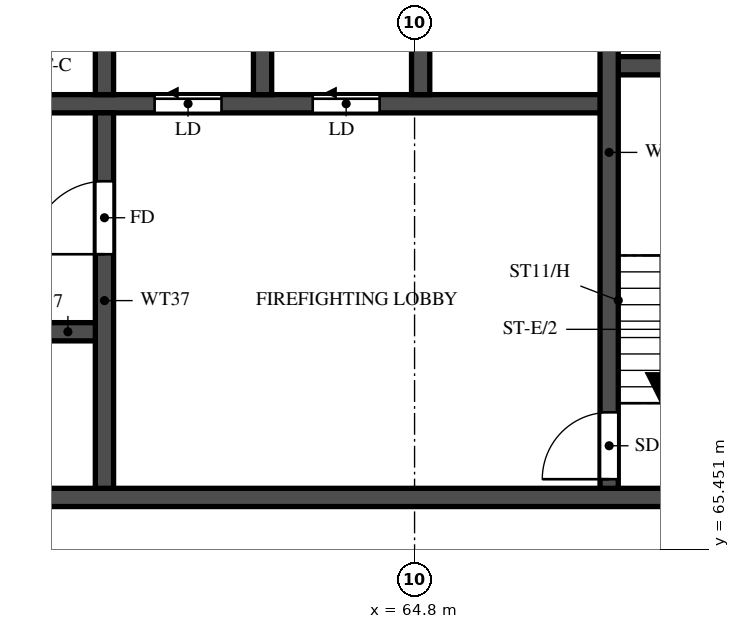
"""IFC4 building model, lengths in metres.
Left out: names, types, materials, properties, quantities, classifications, styles, units other than length and angle.
Written with IfcOpenShell. Run it as: python <this file> out.ifc"""

import sys

from ifc_helpers import new_model, si_unit, direction, frame, frame_2d, origin, place, context, subcontext, project, spatial, rectangle, extrude, element, fill, save


model = new_model("IFC4")
c1 = context("Model", 3, precision=1e-05, world=origin(), true_north=direction((0.0, 1.0)))
c2 = subcontext(c1, "Body", "Model", "MODEL_VIEW")
j1 = project(units=[si_unit("LENGTHUNIT", "METRE"), si_unit("PLANEANGLEUNIT", "RADIAN")], contexts=[c1])
p1 = place(None, origin())
s1 = spatial("IfcSite", under=j1, at=p1, CompositionType="ELEMENT")
p2 = place(p1, origin())
s2 = spatial("IfcBuilding", under=s1, at=p2, CompositionType="ELEMENT")
p3 = place(p2, frame((0.0, 0.0, 264.0)))
s3 = spatial("IfcBuildingStorey", under=s2, at=p3, CompositionType="ELEMENT", Elevation=264.0)
p4 = place(p3, frame((29.2, 66.3, 0.0), z_axis=(0.0, 0.0, 1.0), x_axis=(1.0, 0.0, 0.0)))
e1 = element("IfcWall", 1, at=p4, inside=s3, PredefinedType="SHEAR", context=c2, shape_type="SweptSolid", body=[
    extrude(rectangle(XDim=42.4, YDim=0.3, at=frame_2d((21.2, 0.0))), origin(), (0.0, 0.0, 1.0), 3.22),
])
p5 = place(p4, frame((1.425, 0.0, 0.0)))
e2 = element("IfcOpeningElement", 2, at=p5, cuts=e1, PredefinedType="OPENING", context=c2, shape_type="SweptSolid", body=[
    extrude(rectangle(XDim=1.1, YDim=2.1, at=frame_2d((0.55, 1.05))), frame((0.0, 0.16, 0.0), z_axis=(0.0, -1.0, 0.0), x_axis=(1.0, 0.0, 0.0)), (0.0, 0.0, 1.0), 0.32),
])
p6 = place(p4, frame((4.2, 0.0, 0.0)))
e3 = element("IfcOpeningElement", 3, at=p6, cuts=e1, PredefinedType="OPENING", context=c2, shape_type="SweptSolid", body=[
    extrude(rectangle(XDim=1.8, YDim=2.1, at=frame_2d((0.9, 1.05))), frame((0.0, 0.16, 0.0), z_axis=(0.0, -1.0, 0.0), x_axis=(1.0, 0.0, 0.0)), (0.0, 0.0, 1.0), 0.32),
])
p7 = place(p3, frame((35.65, 69.025, 0.0), z_axis=(0.0, 0.0, 1.0), x_axis=(1.0, 0.0, 0.0)))
e4 = element("IfcWall", 4, at=p7, inside=s3, PredefinedType="SHEAR", context=c2, shape_type="SweptSolid", body=[
    extrude(rectangle(XDim=24.05, YDim=0.3, at=frame_2d((12.025, 0.0))), origin(), (0.0, 0.0, 1.0), 3.22),
])
p8 = place(p7, frame((0.975, 0.0, 0.0)))
e5 = element("IfcOpeningElement", 5, at=p8, cuts=e4, PredefinedType="OPENING", context=c2, shape_type="SweptSolid", body=[
    extrude(rectangle(XDim=1.1, YDim=2.1, at=frame_2d((0.55, 1.05))), frame((0.0, 0.16, 0.0), z_axis=(0.0, -1.0, 0.0), x_axis=(1.0, 0.0, 0.0)), (0.0, 0.0, 1.0), 0.32),
])
p9 = place(p7, frame((3.725, 0.0, 0.0)))
e6 = element("IfcOpeningElement", 6, at=p9, cuts=e4, PredefinedType="OPENING", context=c2, shape_type="SweptSolid", body=[
    extrude(rectangle(XDim=1.1, YDim=2.1, at=frame_2d((0.55, 1.05))), frame((0.0, 0.16, 0.0), z_axis=(0.0, -1.0, 0.0), x_axis=(1.0, 0.0, 0.0)), (0.0, 0.0, 1.0), 0.32),
])
p10 = place(p7, frame((6.475, 0.0, 0.0)))
e7 = element("IfcOpeningElement", 7, at=p10, cuts=e4, PredefinedType="OPENING", context=c2, shape_type="SweptSolid", body=[
    extrude(rectangle(XDim=1.1, YDim=2.1, at=frame_2d((0.55, 1.05))), frame((0.0, 0.16, 0.0), z_axis=(0.0, -1.0, 0.0), x_axis=(1.0, 0.0, 0.0)), (0.0, 0.0, 1.0), 0.32),
])
p11 = place(p7, frame((9.225, 0.0, 0.0)))
e8 = element("IfcOpeningElement", 8, at=p11, cuts=e4, PredefinedType="OPENING", context=c2, shape_type="SweptSolid", body=[
    extrude(rectangle(XDim=1.1, YDim=2.1, at=frame_2d((0.55, 1.05))), frame((0.0, 0.16, 0.0), z_axis=(0.0, -1.0, 0.0), x_axis=(1.0, 0.0, 0.0)), (0.0, 0.0, 1.0), 0.32),
])
p12 = place(p7, frame((11.975, 0.0, 0.0)))
e9 = element("IfcOpeningElement", 9, at=p12, cuts=e4, PredefinedType="OPENING", context=c2, shape_type="SweptSolid", body=[
    extrude(rectangle(XDim=1.1, YDim=2.1, at=frame_2d((0.55, 1.05))), frame((0.0, 0.16, 0.0), z_axis=(0.0, -1.0, 0.0), x_axis=(1.0, 0.0, 0.0)), (0.0, 0.0, 1.0), 0.32),
])
p13 = place(p7, frame((14.725, 0.0, 0.0)))
e10 = element("IfcOpeningElement", 10, at=p13, cuts=e4, PredefinedType="OPENING", context=c2, shape_type="SweptSolid", body=[
    extrude(rectangle(XDim=1.1, YDim=2.1, at=frame_2d((0.55, 1.05))), frame((0.0, 0.16, 0.0), z_axis=(0.0, -1.0, 0.0), x_axis=(1.0, 0.0, 0.0)), (0.0, 0.0, 1.0), 0.32),
])
p14 = place(p7, frame((17.6, 0.0, 0.0)))
e11 = element("IfcOpeningElement", 11, at=p14, cuts=e4, PredefinedType="OPENING", context=c2, shape_type="SweptSolid", body=[
    extrude(rectangle(XDim=1.1, YDim=2.1, at=frame_2d((0.55, 1.05))), frame((0.0, 0.16, 0.0), z_axis=(0.0, -1.0, 0.0), x_axis=(1.0, 0.0, 0.0)), (0.0, 0.0, 1.0), 0.32),
])
p15 = place(p7, frame((20.6, 0.0, 0.0)))
e12 = element("IfcOpeningElement", 12, at=p15, cuts=e4, PredefinedType="OPENING", context=c2, shape_type="SweptSolid", body=[
    extrude(rectangle(XDim=1.1, YDim=2.1, at=frame_2d((0.55, 1.05))), frame((0.0, 0.16, 0.0), z_axis=(0.0, -1.0, 0.0), x_axis=(1.0, 0.0, 0.0)), (0.0, 0.0, 1.0), 0.32),
])
p16 = place(p3, frame((32.8, 72.775, 0.0), z_axis=(0.0, 0.0, 1.0), x_axis=(1.0, 0.0, 0.0)))
e13 = element("IfcWall", 13, at=p16, inside=s3, PredefinedType="SHEAR", context=c2, shape_type="SweptSolid", body=[
    extrude(rectangle(XDim=35.2, YDim=0.3, at=frame_2d((17.6, 0.0))), origin(), (0.0, 0.0, 1.0), 3.22),
])
p17 = place(p16, frame((19.8, 0.0, 0.0)))
e14 = element("IfcOpeningElement", 14, at=p17, cuts=e13, PredefinedType="OPENING", context=c2, shape_type="SweptSolid", body=[
    extrude(rectangle(XDim=1.1, YDim=2.1, at=frame_2d((0.55, 1.05))), frame((0.0, 0.16, 0.0), z_axis=(0.0, -1.0, 0.0), x_axis=(1.0, 0.0, 0.0)), (0.0, 0.0, 1.0), 0.32),
])
p18 = place(p16, frame((27.725, 0.0, 0.0)))
e15 = element("IfcOpeningElement", 15, at=p18, cuts=e13, PredefinedType="OPENING", context=c2, shape_type="SweptSolid", body=[
    extrude(rectangle(XDim=1.1, YDim=2.1, at=frame_2d((0.55, 1.05))), frame((0.0, 0.16, 0.0), z_axis=(0.0, -1.0, 0.0), x_axis=(1.0, 0.0, 0.0)), (0.0, 0.0, 1.0), 0.32),
])
p19 = place(p16, frame((30.325, 0.0, 0.0)))
e16 = element("IfcOpeningElement", 16, at=p19, cuts=e13, PredefinedType="OPENING", context=c2, shape_type="SweptSolid", body=[
    extrude(rectangle(XDim=1.1, YDim=2.1, at=frame_2d((0.55, 1.05))), frame((0.0, 0.16, 0.0), z_axis=(0.0, -1.0, 0.0), x_axis=(1.0, 0.0, 0.0)), (0.0, 0.0, 1.0), 0.32),
])
p20 = place(p16, frame((3.825, 0.0, 0.0)))
e17 = element("IfcOpeningElement", 17, at=p20, cuts=e13, PredefinedType="OPENING", context=c2, shape_type="SweptSolid", body=[
    extrude(rectangle(XDim=1.1, YDim=2.1, at=frame_2d((0.55, 1.05))), frame((0.0, 0.16, 0.0), z_axis=(0.0, -1.0, 0.0), x_axis=(1.0, 0.0, 0.0)), (0.0, 0.0, 1.0), 0.32),
])
p21 = place(p16, frame((6.575, 0.0, 0.0)))
e18 = element("IfcOpeningElement", 18, at=p21, cuts=e13, PredefinedType="OPENING", context=c2, shape_type="SweptSolid", body=[
    extrude(rectangle(XDim=1.1, YDim=2.1, at=frame_2d((0.55, 1.05))), frame((0.0, 0.16, 0.0), z_axis=(0.0, -1.0, 0.0), x_axis=(1.0, 0.0, 0.0)), (0.0, 0.0, 1.0), 0.32),
])
p22 = place(p16, frame((9.325, 0.0, 0.0)))
e19 = element("IfcOpeningElement", 19, at=p22, cuts=e13, PredefinedType="OPENING", context=c2, shape_type="SweptSolid", body=[
    extrude(rectangle(XDim=1.1, YDim=2.1, at=frame_2d((0.55, 1.05))), frame((0.0, 0.16, 0.0), z_axis=(0.0, -1.0, 0.0), x_axis=(1.0, 0.0, 0.0)), (0.0, 0.0, 1.0), 0.32),
])
p23 = place(p16, frame((12.075, 0.0, 0.0)))
e20 = element("IfcOpeningElement", 20, at=p23, cuts=e13, PredefinedType="OPENING", context=c2, shape_type="SweptSolid", body=[
    extrude(rectangle(XDim=1.1, YDim=2.1, at=frame_2d((0.55, 1.05))), frame((0.0, 0.16, 0.0), z_axis=(0.0, -1.0, 0.0), x_axis=(1.0, 0.0, 0.0)), (0.0, 0.0, 1.0), 0.32),
])
p24 = place(p16, frame((14.825, 0.0, 0.0)))
e21 = element("IfcOpeningElement", 21, at=p24, cuts=e13, PredefinedType="OPENING", context=c2, shape_type="SweptSolid", body=[
    extrude(rectangle(XDim=1.1, YDim=2.1, at=frame_2d((0.55, 1.05))), frame((0.0, 0.16, 0.0), z_axis=(0.0, -1.0, 0.0), x_axis=(1.0, 0.0, 0.0)), (0.0, 0.0, 1.0), 0.32),
])
p25 = place(p16, frame((17.575, 0.0, 0.0)))
e22 = element("IfcOpeningElement", 22, at=p25, cuts=e13, PredefinedType="OPENING", context=c2, shape_type="SweptSolid", body=[
    extrude(rectangle(XDim=1.1, YDim=2.1, at=frame_2d((0.55, 1.05))), frame((0.0, 0.16, 0.0), z_axis=(0.0, -1.0, 0.0), x_axis=(1.0, 0.0, 0.0)), (0.0, 0.0, 1.0), 0.32),
])
p26 = place(p16, frame((0.95, 0.0, 0.0)))
e23 = element("IfcOpeningElement", 23, at=p26, cuts=e13, PredefinedType="OPENING", context=c2, shape_type="SweptSolid", body=[
    extrude(rectangle(XDim=1.1, YDim=2.1, at=frame_2d((0.55, 1.05))), frame((0.0, 0.16, 0.0), z_axis=(0.0, -1.0, 0.0), x_axis=(1.0, 0.0, 0.0)), (0.0, 0.0, 1.0), 0.32),
])
p27 = place(p3, frame((68.0, 73.4, 0.0), z_axis=(0.0, 0.0, 1.0), x_axis=(1.0, 0.0, 0.0)))
e24 = element("IfcWall", 24, at=p27, inside=s3, PredefinedType="SHEAR", context=c2, shape_type="SweptSolid", body=[
    extrude(rectangle(XDim=3.1, YDim=0.3, at=frame_2d((1.55, 0.0))), origin(), (0.0, 0.0, 1.0), 3.22),
])
p28 = place(p3, frame((68.0, 66.45, 0.0), z_axis=(0.0, 0.0, 1.0), x_axis=(0.0, 1.0, 0.0)))
e25 = element("IfcWall", 25, at=p28, inside=s3, PredefinedType="SHEAR", context=c2, shape_type="SweptSolid", body=[
    extrude(rectangle(XDim=11.05, YDim=0.3, at=frame_2d((5.525, 0.0))), origin(), (0.0, 0.0, 1.0), 3.22),
])
p29 = place(p28, frame((0.15, 0.0, 0.0)))
e26 = element("IfcOpeningElement", 26, at=p29, cuts=e25, PredefinedType="OPENING", context=c2, shape_type="SweptSolid", body=[
    extrude(rectangle(XDim=1.1, YDim=2.1, at=frame_2d((0.55, 1.05))), frame((0.0, 0.16, 0.0), z_axis=(0.0, -1.0, 0.0), x_axis=(1.0, 0.0, 0.0)), (0.0, 0.0, 1.0), 0.32),
])
p30 = place(p3, frame((59.7, 66.45, 0.0), z_axis=(0.0, 0.0, 1.0), x_axis=(0.0, 1.0, 0.0)))
e27 = element("IfcWall", 27, at=p30, inside=s3, PredefinedType="SHEAR", context=c2, shape_type="SweptSolid", body=[
    extrude(rectangle(XDim=6.175, YDim=0.3, at=frame_2d((3.087, 0.0))), origin(), (0.0, 0.0, 1.0), 3.22),
])
p31 = place(p30, frame((3.85, 0.0, 0.0)))
e28 = element("IfcOpeningElement", 28, at=p31, cuts=e27, PredefinedType="OPENING", context=c2, shape_type="SweptSolid", body=[
    extrude(rectangle(XDim=1.2, YDim=2.1, at=frame_2d((0.6, 1.05))), frame((0.0, 0.16, 0.0), z_axis=(0.0, -1.0, 0.0), x_axis=(1.0, 0.0, 0.0)), (0.0, 0.0, 1.0), 0.32),
])
for number, where, z_axis, x_axis in (
    (29, (59.7, 72.925, 0.0), (0.0, 0.0, 1.0), (0.0, 1.0, 0.0)),
    (30, (62.3, 72.925, 0.0), (0.0, 0.0, 1.0), (0.0, 1.0, 0.0)),
    (31, (64.9, 72.925, 0.0), (0.0, 0.0, 1.0), (0.0, 1.0, 0.0)),
):
    element("IfcWall", number, at=place(p3, frame(where, z_axis=z_axis, x_axis=x_axis)), inside=s3, PredefinedType="SHEAR", context=c2, shape_type="SweptSolid", body=[
        extrude(rectangle(XDim=2.95, YDim=0.3, at=frame_2d((1.475, 0.0))), origin(), (0.0, 0.0, 1.0), 3.22),
    ])
p32 = place(p29, origin())
e32 = element("IfcDoor", 32, at=p32, inside=s3, OperationType="SINGLE_SWING_RIGHT", PredefinedType="DOOR", context=c2, shape_type="SweptSolid", body=[
    extrude(rectangle(XDim=1.1, YDim=2.1, at=frame_2d((0.55, 1.05))), frame((0.0, 0.025, 0.0), z_axis=(0.0, -1.0, 0.0), x_axis=(1.0, 0.0, 0.0)), (0.0, 0.0, 1.0), 0.05),
])
fill(e26, e32)
p33 = place(p31, origin())
e33 = element("IfcDoor", 33, at=p33, inside=s3, OperationType="SINGLE_SWING_LEFT", PredefinedType="DOOR", context=c2, shape_type="SweptSolid", body=[
    extrude(rectangle(XDim=1.2, YDim=2.1, at=frame_2d((0.6, 1.05))), frame((0.0, 0.025, 0.0), z_axis=(0.0, -1.0, 0.0), x_axis=(1.0, 0.0, 0.0)), (0.0, 0.0, 1.0), 0.05),
])
fill(e28, e33)
p34 = place(p18, origin())
e34 = element("IfcDoor", 34, at=p34, inside=s3, OperationType="SLIDING_TO_LEFT", PredefinedType="DOOR", context=c2, shape_type="SweptSolid", body=[
    extrude(rectangle(XDim=1.1, YDim=2.1, at=frame_2d((0.55, 1.05))), frame((0.0, 0.025, 0.0), z_axis=(0.0, -1.0, 0.0), x_axis=(1.0, 0.0, 0.0)), (0.0, 0.0, 1.0), 0.05),
])
fill(e15, e34)
p35 = place(p19, origin())
e35 = element("IfcDoor", 35, at=p35, inside=s3, OperationType="SLIDING_TO_LEFT", PredefinedType="DOOR", context=c2, shape_type="SweptSolid", body=[
    extrude(rectangle(XDim=1.1, YDim=2.1, at=frame_2d((0.55, 1.05))), frame((0.0, 0.025, 0.0), z_axis=(0.0, -1.0, 0.0), x_axis=(1.0, 0.0, 0.0)), (0.0, 0.0, 1.0), 0.05),
])
fill(e16, e35)
save(model, sys.argv[1])
